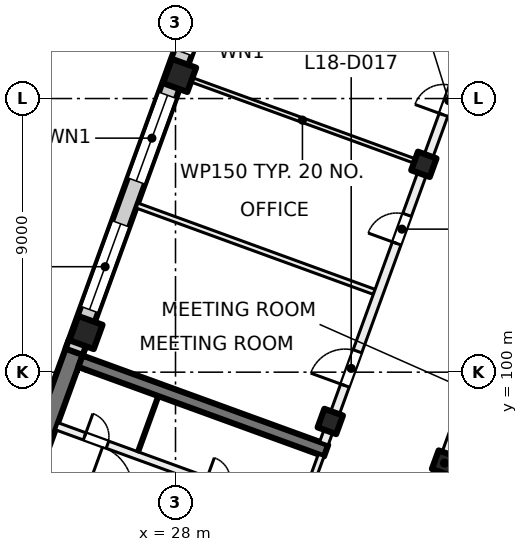
"""IFC4 building model, lengths in metres.
Left out: names, types, materials, properties, quantities, classifications, styles, units other than length and angle.
Written with IfcOpenShell. Run it as: python <this file> out.ifc"""

import sys

from ifc_helpers import new_model, si_unit, direction, frame, frame_2d, origin, origin_2d, place, context, subcontext, project, spatial, rectangle, extrude, element, fill, save


model = new_model("IFC4")
c1 = context("Model", 3, precision=1e-05, world=origin(), true_north=direction((0.0, 1.0)))
c2 = subcontext(c1, "Body", "Model", "MODEL_VIEW")
j1 = project(units=[si_unit("LENGTHUNIT", "METRE"), si_unit("PLANEANGLEUNIT", "RADIAN")], contexts=[c1])
p1 = place(None, origin())
s1 = spatial("IfcSite", under=j1, at=p1, CompositionType="ELEMENT")
p2 = place(p1, origin())
s2 = spatial("IfcBuilding", under=s1, at=p2, CompositionType="ELEMENT")
p3 = place(p2, frame((0.0, 0.0, 81.0)))
s3 = spatial("IfcBuildingStorey", under=s2, at=p3, CompositionType="ELEMENT", Elevation=81.0)
for number, where, z_axis, x_axis in (
    (1, (36.849, 97.011, 0.0), (0.0, 0.0, 1.0), (-0.342, -0.94, 0.0)),
    (2, (36.169, 106.836, 0.0), (0.0, 0.0, 1.0), (-0.342, -0.94, 0.0)),
    (3, (33.091, 98.379, 0.0), (0.0, 0.0, 1.0), (-0.342, -0.94, 0.0)),
):
    element("IfcColumn", number, at=place(p3, frame(where, z_axis=z_axis, x_axis=x_axis)), inside=s3, PredefinedType="COLUMN", context=c2, shape_type="SweptSolid", body=[
        extrude(rectangle(XDim=0.65, YDim=0.65, at=origin_2d()), origin(), (0.0, 0.0, 1.0), 4.0),
    ])
for number, where, z_axis, x_axis in (
    (4, (28.134, 109.76, 0.0), (0.0, 0.0, 1.0), (-0.342, -0.94, 0.0)),
    (5, (25.056, 101.303, 0.0), (0.0, 0.0, 1.0), (-0.342, -0.94, 0.0)),
):
    element("IfcColumn", number, at=place(p3, frame(where, z_axis=z_axis, x_axis=x_axis)), inside=s3, PredefinedType="COLUMN", context=c2, shape_type="SweptSolid", body=[
        extrude(rectangle(XDim=0.85, YDim=0.85, at=origin_2d()), origin(), (0.0, 0.0, 1.0), 4.0),
    ])
p4 = place(p3, frame((21.717, 92.568, 0.0), z_axis=(0.0, 0.0, 1.0), x_axis=(0.342017595281, 0.939693548195, 0.0)))
e6 = element("IfcWall", 6, at=p4, inside=s3, PredefinedType="SHEAR", context=c2, shape_type="SweptSolid", body=[
    extrude(rectangle(XDim=8.925, YDim=0.6, at=frame_2d((4.462, 0.0))), origin(), (0.0, 0.0, 1.0), 4.0),
])
p5 = place(p3, frame((32.953, 97.418, 0.0), z_axis=(0.0, 0.0, 1.0), x_axis=(-0.93969060187, 0.342025690201, 0.0)))
e7 = element("IfcWall", 7, at=p5, inside=s3, PredefinedType="SHEAR", context=c2, shape_type="SweptSolid", body=[
    extrude(rectangle(XDim=8.6, YDim=0.4, at=frame_2d((4.3, 0.0))), origin(), (0.0, 0.0, 1.0), 4.0),
])
p6 = place(p3, frame((24.666, 100.669, 0.0), z_axis=(0.0, 0.0, 1.0), x_axis=(0.34201964167, 0.939692803373, 0.0)))
e8 = element("IfcWall", 8, at=p6, inside=s3, PredefinedType="SOLIDWALL", context=c2, shape_type="SweptSolid", body=[
    extrude(rectangle(XDim=32.884, YDim=0.6, at=frame_2d((16.442, 0.0))), origin(), (0.0, 0.0, 1.0), 3.625),
])
p7 = place(p6, frame((1.48, 0.0, 0.9)))
e9 = element("IfcOpeningElement", 9, at=p7, cuts=e8, PredefinedType="OPENING", context=c2, shape_type="SweptSolid", body=[
    extrude(rectangle(XDim=3.0, YDim=2.4, at=frame_2d((1.5, 1.2))), frame((0.0, 0.31, 0.0), z_axis=(0.0, -1.0, 0.0), x_axis=(1.0, 0.0, 0.0)), (0.0, 0.0, 1.0), 0.62),
])
p8 = place(p6, frame((5.98, 0.0, 0.9)))
e10 = element("IfcOpeningElement", 10, at=p8, cuts=e8, PredefinedType="OPENING", context=c2, shape_type="SweptSolid", body=[
    extrude(rectangle(XDim=3.0, YDim=2.4, at=frame_2d((1.5, 1.2))), frame((0.0, 0.31, 0.0), z_axis=(0.0, -1.0, 0.0), x_axis=(1.0, 0.0, 0.0)), (0.0, 0.0, 1.0), 0.62),
])
p9 = place(p6, frame((10.48, 0.0, 0.9)))
e11 = element("IfcOpeningElement", 11, at=p9, cuts=e8, PredefinedType="OPENING", context=c2, shape_type="SweptSolid", body=[
    extrude(rectangle(XDim=3.0, YDim=2.4, at=frame_2d((1.5, 1.2))), frame((0.0, 0.31, 0.0), z_axis=(0.0, -1.0, 0.0), x_axis=(1.0, 0.0, 0.0)), (0.0, 0.0, 1.0), 0.62),
])
p10 = place(p6, frame((14.98, 0.0, 0.9)))
e12 = element("IfcOpeningElement", 12, at=p10, cuts=e8, PredefinedType="OPENING", context=c2, shape_type="SweptSolid", body=[
    extrude(rectangle(XDim=3.0, YDim=2.4, at=frame_2d((1.5, 1.2))), frame((0.0, 0.31, 0.0), z_axis=(0.0, -1.0, 0.0), x_axis=(1.0, 0.0, 0.0)), (0.0, 0.0, 1.0), 0.62),
])
p11 = place(p6, frame((20.08, 0.0, 0.0)))
e13 = element("IfcOpeningElement", 13, at=p11, cuts=e8, PredefinedType="OPENING", context=c2, shape_type="SweptSolid", body=[
    extrude(rectangle(XDim=1.8, YDim=2.4, at=frame_2d((0.9, 1.2))), frame((0.0, 0.31, 0.0), z_axis=(0.0, -1.0, 0.0), x_axis=(1.0, 0.0, 0.0)), (0.0, 0.0, 1.0), 0.62),
])
p12 = place(p6, frame((23.98, 0.0, 0.9)))
e14 = element("IfcOpeningElement", 14, at=p12, cuts=e8, PredefinedType="OPENING", context=c2, shape_type="SweptSolid", body=[
    extrude(rectangle(XDim=3.0, YDim=2.4, at=frame_2d((1.5, 1.2))), frame((0.0, 0.31, 0.0), z_axis=(0.0, -1.0, 0.0), x_axis=(1.0, 0.0, 0.0)), (0.0, 0.0, 1.0), 0.62),
])
p13 = place(p6, frame((28.48, 0.0, 0.9)))
e15 = element("IfcOpeningElement", 15, at=p13, cuts=e8, PredefinedType="OPENING", context=c2, shape_type="SweptSolid", body=[
    extrude(rectangle(XDim=3.0, YDim=2.4, at=frame_2d((1.5, 1.2))), frame((0.0, 0.31, 0.0), z_axis=(0.0, -1.0, 0.0), x_axis=(1.0, 0.0, 0.0)), (0.0, 0.0, 1.0), 0.62),
])
p14 = place(p3, frame((31.491, 93.693, 0.0), z_axis=(0.0, 0.0, 1.0), x_axis=(0.341995824804, 0.939701471648, 0.0)))
e16 = element("IfcWall", 16, at=p14, inside=s3, PredefinedType="PARTITIONING", context=c2, shape_type="SweptSolid", body=[
    extrude(rectangle(XDim=3.8, YDim=0.2, at=frame_2d((1.9, 0.0))), origin(), (0.0, 0.0, 1.0), 3.625),
])
p15 = place(p14, frame((0.3, 0.0, 0.0)))
e17 = element("IfcOpeningElement", 17, at=p15, cuts=e16, PredefinedType="OPENING", context=c2, shape_type="SweptSolid", body=[
    extrude(rectangle(XDim=1.2, YDim=2.1, at=frame_2d((0.6, 1.05))), frame((0.0, 0.11, 0.0), z_axis=(0.0, -1.0, 0.0), x_axis=(1.0, 0.0, 0.0)), (0.0, 0.0, 1.0), 0.22),
])
p16 = place(p3, frame((23.538, 96.694, 0.0), z_axis=(0.0, 0.0, 1.0), x_axis=(0.939691552312, -0.342023078919, 0.0)))
e18 = element("IfcWall", 18, at=p16, inside=s3, PredefinedType="PARTITIONING", context=c2, shape_type="SweptSolid", body=[
    extrude(rectangle(XDim=8.4, YDim=0.2, at=frame_2d((4.2, 0.0))), origin(), (0.0, 0.0, 1.0), 3.625),
])
p17 = place(p16, frame((1.65, 0.0, 0.0)))
e19 = element("IfcOpeningElement", 19, at=p17, cuts=e18, PredefinedType="OPENING", context=c2, shape_type="SweptSolid", body=[
    extrude(rectangle(XDim=1.5, YDim=2.1, at=frame_2d((0.75, 1.05))), frame((0.0, 0.11, 0.0), z_axis=(0.0, -1.0, 0.0), x_axis=(1.0, 0.0, 0.0)), (0.0, 0.0, 1.0), 0.22),
])
p18 = place(p3, frame((24.094, 98.221, 0.0), z_axis=(0.0, 0.0, 1.0), x_axis=(0.939691552312, -0.342023078919, 0.0)))
e20 = element("IfcWall", 20, at=p18, inside=s3, PredefinedType="PARTITIONING", context=c2, shape_type="SweptSolid", body=[
    extrude(rectangle(XDim=8.4, YDim=0.25, at=frame_2d((4.2, 0.0))), origin(), (0.0, 0.0, 1.0), 3.625),
])
p19 = place(p18, frame((5.225, 0.0, 0.0)))
e21 = element("IfcOpeningElement", 21, at=p19, cuts=e20, PredefinedType="OPENING", context=c2, shape_type="SweptSolid", body=[
    extrude(rectangle(XDim=0.8, YDim=2.1, at=frame_2d((0.4, 1.05))), frame((0.0, 0.135, 0.0), z_axis=(0.0, -1.0, 0.0), x_axis=(1.0, 0.0, 0.0)), (0.0, 0.0, 1.0), 0.27),
])
p20 = place(p18, frame((0.975, 0.0, 0.0)))
e22 = element("IfcOpeningElement", 22, at=p20, cuts=e20, PredefinedType="OPENING", context=c2, shape_type="SweptSolid", body=[
    extrude(rectangle(XDim=0.8, YDim=2.1, at=frame_2d((0.4, 1.05))), frame((0.0, 0.135, 0.0), z_axis=(0.0, -1.0, 0.0), x_axis=(1.0, 0.0, 0.0)), (0.0, 0.0, 1.0), 0.27),
])
p21 = place(p3, frame((26.768, 97.381, 0.0), z_axis=(0.0, 0.0, 1.0), x_axis=(0.342024501273, 0.939691034611, 0.0)))
e23 = element("IfcWall", 23, at=p21, inside=s3, PredefinedType="PARTITIONING", context=c2, shape_type="SweptSolid", body=[
    extrude(rectangle(XDim=1.95, YDim=0.1, at=frame_2d((0.975, 0.0))), origin(), (0.0, 0.0, 1.0), 3.625),
])
p22 = place(p3, frame((26.736, 105.48, 0.0), z_axis=(0.0, 0.0, 1.0), x_axis=(0.93969376504, -0.342016999496, 0.0)))
e24 = element("IfcWall", 24, at=p22, inside=s3, PredefinedType="PARTITIONING", context=c2, shape_type="SweptSolid", body=[
    extrude(rectangle(XDim=8.3, YDim=0.175, at=frame_2d((4.15, 0.0))), origin(), (0.0, 0.0, 1.0), 3.625),
])
p23 = place(p3, frame((28.275, 109.709, 0.0), z_axis=(0.0, 0.0, 1.0), x_axis=(0.939697205528, -0.342007546586, 0.0)))
e25 = element("IfcWall", 25, at=p23, inside=s3, PredefinedType="PARTITIONING", context=c2, shape_type="SweptSolid", body=[
    extrude(rectangle(XDim=8.301, YDim=0.15, at=frame_2d((4.15, 0.0))), origin(), (0.0, 0.0, 1.0), 3.625),
])
p24 = place(p3, frame((32.881, 97.657, 0.0), z_axis=(0.0, 0.0, 1.0), x_axis=(0.342017360004, 0.939693633828, 0.0)))
e26 = element("IfcWall", 26, at=p24, inside=s3, PredefinedType="PARTITIONING", context=c2, shape_type="SweptSolid", body=[
    extrude(rectangle(XDim=34.516, YDim=0.3, at=frame_2d((17.258, 0.0))), origin(), (0.0, 0.0, 1.0), 3.625),
])
p25 = place(p24, frame((2.025, 0.0, 0.0)))
e27 = element("IfcOpeningElement", 27, at=p25, cuts=e26, PredefinedType="OPENING", context=c2, shape_type="SweptSolid", body=[
    extrude(rectangle(XDim=1.2, YDim=2.1, at=frame_2d((0.6, 1.05))), frame((0.0, 0.16, 0.0), z_axis=(0.0, -1.0, 0.0), x_axis=(1.0, 0.0, 0.0)), (0.0, 0.0, 1.0), 0.32),
])
p26 = place(p24, frame((7.0, 0.0, 0.0)))
e28 = element("IfcOpeningElement", 28, at=p26, cuts=e26, PredefinedType="OPENING", context=c2, shape_type="SweptSolid", body=[
    extrude(rectangle(XDim=1.0, YDim=2.1, at=frame_2d((0.5, 1.05))), frame((0.0, 0.16, 0.0), z_axis=(0.0, -1.0, 0.0), x_axis=(1.0, 0.0, 0.0)), (0.0, 0.0, 1.0), 0.32),
])
p27 = place(p24, frame((11.5, 0.0, 0.0)))
e29 = element("IfcOpeningElement", 29, at=p27, cuts=e26, PredefinedType="OPENING", context=c2, shape_type="SweptSolid", body=[
    extrude(rectangle(XDim=1.0, YDim=2.1, at=frame_2d((0.5, 1.05))), frame((0.0, 0.16, 0.0), z_axis=(0.0, -1.0, 0.0), x_axis=(1.0, 0.0, 0.0)), (0.0, 0.0, 1.0), 0.32),
])
p28 = place(p24, frame((16.0, 0.0, 0.0)))
e30 = element("IfcOpeningElement", 30, at=p28, cuts=e26, PredefinedType="OPENING", context=c2, shape_type="SweptSolid", body=[
    extrude(rectangle(XDim=1.0, YDim=2.1, at=frame_2d((0.5, 1.05))), frame((0.0, 0.16, 0.0), z_axis=(0.0, -1.0, 0.0), x_axis=(1.0, 0.0, 0.0)), (0.0, 0.0, 1.0), 0.32),
])
p29 = place(p24, frame((20.5, 0.0, 0.0)))
e31 = element("IfcOpeningElement", 31, at=p29, cuts=e26, PredefinedType="OPENING", context=c2, shape_type="SweptSolid", body=[
    extrude(rectangle(XDim=1.0, YDim=2.1, at=frame_2d((0.5, 1.05))), frame((0.0, 0.16, 0.0), z_axis=(0.0, -1.0, 0.0), x_axis=(1.0, 0.0, 0.0)), (0.0, 0.0, 1.0), 0.32),
])
p30 = place(p24, frame((25.0, 0.0, 0.0)))
e32 = element("IfcOpeningElement", 32, at=p30, cuts=e26, PredefinedType="OPENING", context=c2, shape_type="SweptSolid", body=[
    extrude(rectangle(XDim=1.0, YDim=2.1, at=frame_2d((0.5, 1.05))), frame((0.0, 0.16, 0.0), z_axis=(0.0, -1.0, 0.0), x_axis=(1.0, 0.0, 0.0)), (0.0, 0.0, 1.0), 0.32),
])
p31 = place(p24, frame((29.779, 0.0, 0.0)))
e33 = element("IfcOpeningElement", 33, at=p31, cuts=e26, PredefinedType="OPENING", context=c2, shape_type="SweptSolid", body=[
    extrude(rectangle(XDim=1.8, YDim=2.1, at=frame_2d((0.9, 1.05))), frame((0.0, 0.16, 0.0), z_axis=(0.0, -1.0, 0.0), x_axis=(1.0, 0.0, 0.0)), (0.0, 0.0, 1.0), 0.32),
])
p32 = place(p3, frame((47.314, 125.909, 0.0), z_axis=(0.0, 0.0, 1.0), x_axis=(-0.342010770371, -0.939696032209, 0.0)))
e34 = element("IfcWall", 34, at=p32, inside=s3, PredefinedType="PARTITIONING", context=c2, shape_type="SweptSolid", body=[
    extrude(rectangle(XDim=31.485, YDim=0.3, at=frame_2d((15.742, 0.0))), origin(), (0.0, 0.0, 1.0), 3.625),
])
p33 = place(p32, frame((28.259, 0.0, 0.0)))
e35 = element("IfcOpeningElement", 35, at=p33, cuts=e34, PredefinedType="OPENING", context=c2, shape_type="SweptSolid", body=[
    extrude(rectangle(XDim=1.2, YDim=2.1, at=frame_2d((0.6, 1.05))), frame((0.0, 0.16, 0.0), z_axis=(0.0, -1.0, 0.0), x_axis=(1.0, 0.0, 0.0)), (0.0, 0.0, 1.0), 0.32),
])
p34 = place(p32, frame((18.584, 0.0, 0.0)))
e36 = element("IfcOpeningElement", 36, at=p34, cuts=e34, PredefinedType="OPENING", context=c2, shape_type="SweptSolid", body=[
    extrude(rectangle(XDim=1.8, YDim=2.1, at=frame_2d((0.9, 1.05))), frame((0.0, 0.16, 0.0), z_axis=(0.0, -1.0, 0.0), x_axis=(1.0, 0.0, 0.0)), (0.0, 0.0, 1.0), 0.32),
])
p35 = place(p32, frame((9.985, 0.0, 0.0)))
e37 = element("IfcOpeningElement", 37, at=p35, cuts=e34, PredefinedType="OPENING", context=c2, shape_type="SweptSolid", body=[
    extrude(rectangle(XDim=1.0, YDim=2.1, at=frame_2d((0.5, 1.05))), frame((0.0, 0.16, 0.0), z_axis=(0.0, -1.0, 0.0), x_axis=(1.0, 0.0, 0.0)), (0.0, 0.0, 1.0), 0.32),
])
p36 = place(p32, frame((5.484, 0.0, 0.0)))
e38 = element("IfcOpeningElement", 38, at=p36, cuts=e34, PredefinedType="OPENING", context=c2, shape_type="SweptSolid", body=[
    extrude(rectangle(XDim=1.0, YDim=2.1, at=frame_2d((0.5, 1.05))), frame((0.0, 0.16, 0.0), z_axis=(0.0, -1.0, 0.0), x_axis=(1.0, 0.0, 0.0)), (0.0, 0.0, 1.0), 0.32),
])
p37 = place(p7, origin())
e39 = element("IfcWindow", 39, at=p37, inside=s3, PartitioningType="SINGLE_PANEL", PredefinedType="WINDOW", context=c2, shape_type="SweptSolid", body=[
    extrude(rectangle(XDim=3.0, YDim=2.4, at=frame_2d((1.5, 1.2))), frame((0.0, 0.03, 0.0), z_axis=(0.0, -1.0, 0.0), x_axis=(1.0, 0.0, 0.0)), (0.0, 0.0, 1.0), 0.06),
])
fill(e9, e39)
p38 = place(p8, origin())
e40 = element("IfcWindow", 40, at=p38, inside=s3, PartitioningType="SINGLE_PANEL", PredefinedType="WINDOW", context=c2, shape_type="SweptSolid", body=[
    extrude(rectangle(XDim=3.0, YDim=2.4, at=frame_2d((1.5, 1.2))), frame((0.0, 0.03, 0.0), z_axis=(0.0, -1.0, 0.0), x_axis=(1.0, 0.0, 0.0)), (0.0, 0.0, 1.0), 0.06),
])
fill(e10, e40)
p39 = place(p9, origin())
e41 = element("IfcWindow", 41, at=p39, inside=s3, PartitioningType="SINGLE_PANEL", PredefinedType="WINDOW", context=c2, shape_type="SweptSolid", body=[
    extrude(rectangle(XDim=3.0, YDim=2.4, at=frame_2d((1.5, 1.2))), frame((0.0, 0.03, 0.0), z_axis=(0.0, -1.0, 0.0), x_axis=(1.0, 0.0, 0.0)), (0.0, 0.0, 1.0), 0.06),
])
fill(e11, e41)
p40 = place(p20, origin())
e42 = element("IfcDoor", 42, at=p40, inside=s3, OperationType="SINGLE_SWING_RIGHT", PredefinedType="DOOR", context=c2, shape_type="SweptSolid", body=[
    extrude(rectangle(XDim=0.8, YDim=2.1, at=frame_2d((0.4, 1.05))), frame((0.0, 0.025, 0.0), z_axis=(0.0, -1.0, 0.0), x_axis=(1.0, 0.0, 0.0)), (0.0, 0.0, 1.0), 0.05),
])
fill(e22, e42)
p41 = place(p25, origin())
e43 = element("IfcDoor", 43, at=p41, inside=s3, OperationType="DOUBLE_DOOR_SINGLE_SWING", PredefinedType="DOOR", context=c2, shape_type="SweptSolid", body=[
    extrude(rectangle(XDim=1.2, YDim=2.1, at=frame_2d((0.6, 1.05))), frame((0.0, 0.025, 0.0), z_axis=(0.0, -1.0, 0.0), x_axis=(1.0, 0.0, 0.0)), (0.0, 0.0, 1.0), 0.05),
])
fill(e27, e43)
p42 = place(p26, origin())
e44 = element("IfcDoor", 44, at=p42, inside=s3, OperationType="SINGLE_SWING_LEFT", PredefinedType="DOOR", context=c2, shape_type="SweptSolid", body=[
    extrude(rectangle(XDim=1.0, YDim=2.1, at=frame_2d((0.5, 1.05))), frame((0.0, 0.025, 0.0), z_axis=(0.0, -1.0, 0.0), x_axis=(1.0, 0.0, 0.0)), (0.0, 0.0, 1.0), 0.05),
])
fill(e28, e44)
p43 = place(p27, origin())
e45 = element("IfcDoor", 45, at=p43, inside=s3, OperationType="SINGLE_SWING_RIGHT", PredefinedType="DOOR", context=c2, shape_type="SweptSolid", body=[
    extrude(rectangle(XDim=1.0, YDim=2.1, at=frame_2d((0.5, 1.05))), frame((0.0, 0.025, 0.0), z_axis=(0.0, -1.0, 0.0), x_axis=(1.0, 0.0, 0.0)), (0.0, 0.0, 1.0), 0.05),
])
fill(e29, e45)
save(model, sys.argv[1])
